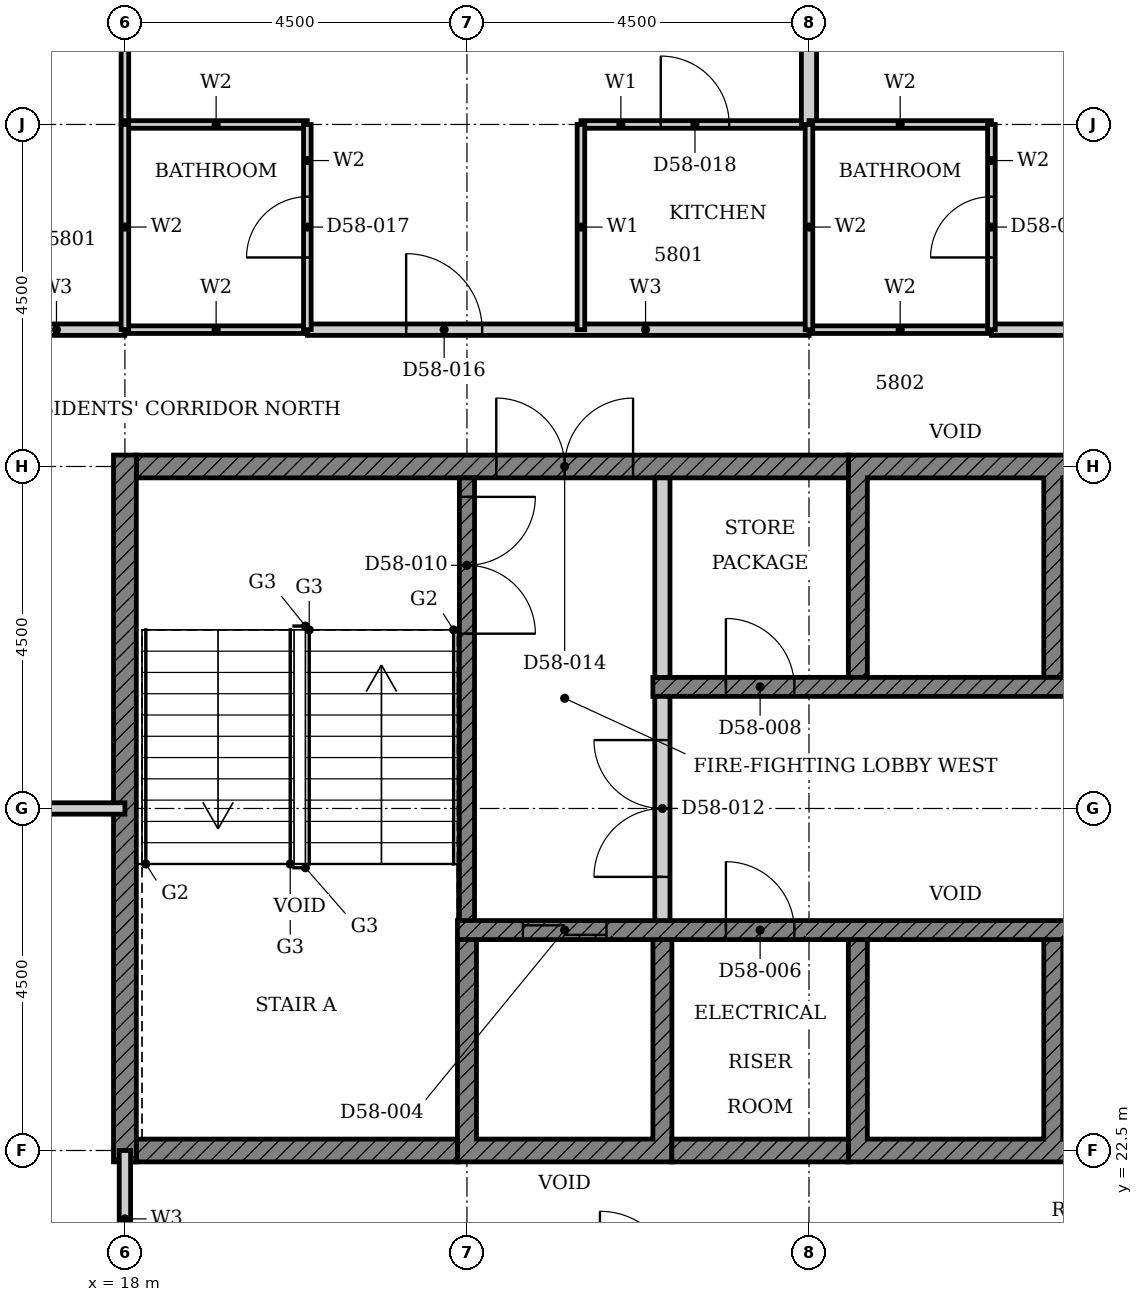
"""IFC4 building model, lengths in metres.
Left out: names, types, materials, properties, quantities, classifications, styles, units other than length and angle.
Written with IfcOpenShell. Run it as: python <this file> out.ifc"""

import sys

from ifc_helpers import new_model, si_unit, direction, frame, frame_2d, origin, place, context, subcontext, project, spatial, polyline, rectangle, outline, extrude, element, fill, save


model = new_model("IFC4")
c1 = context("Model", 3, precision=1e-05, world=origin(), true_north=direction((0.0, 1.0)))
c2 = subcontext(c1, "Body", "Model", "MODEL_VIEW")
j1 = project(units=[si_unit("LENGTHUNIT", "METRE"), si_unit("PLANEANGLEUNIT", "RADIAN")], contexts=[c1])
p1 = place(None, origin())
s1 = spatial("IfcSite", under=j1, at=p1, CompositionType="ELEMENT")
p2 = place(p1, origin())
s2 = spatial("IfcBuilding", under=s1, at=p2, CompositionType="ELEMENT")
p3 = place(p2, frame((0.0, 0.0, 229.4)))
s3 = spatial("IfcBuildingStorey", under=s2, at=p3, CompositionType="ELEMENT", Elevation=229.4)
p4 = place(p3, origin())
e1 = element("IfcWall", 1, at=p4, inside=s3, PredefinedType="SHEAR", context=c2, shape_type="SweptSolid", body=[
    extrude(outline(polyline([(22.375, 22.35), (25.197, 22.35), (25.197, 25.275), (24.947, 25.275), (24.947, 22.65), (22.625, 22.65), (22.625, 25.275), (22.375, 25.275), (22.375, 22.35)])), origin(), (0.0, 0.0, 1.0), 3.3),
])
p5 = place(p3, origin())
e2 = element("IfcWall", 2, at=p5, inside=s3, PredefinedType="SHEAR", context=c2, shape_type="SweptSolid", body=[
    extrude(outline(polyline([(27.518, 22.35), (32.911, 22.35), (32.911, 25.275), (32.661, 25.275), (32.661, 22.65), (30.339, 22.65), (30.339, 25.275), (30.089, 25.275), (30.089, 22.65), (27.768, 22.65), (27.768, 25.275), (27.518, 25.275), (27.518, 22.35)])), origin(), (0.0, 0.0, 1.0), 3.3),
])
p6 = place(p3, origin())
e3 = element("IfcWall", 3, at=p6, inside=s3, PredefinedType="SHEAR", context=c2, shape_type="SweptSolid", body=[
    extrude(outline(polyline([(27.518, 28.725), (27.768, 28.725), (27.768, 31.35), (30.089, 31.35), (30.089, 28.725), (30.339, 28.725), (30.339, 31.35), (32.661, 31.35), (32.661, 28.725), (32.911, 28.725), (32.911, 31.65), (27.518, 31.65), (27.518, 28.725)])), origin(), (0.0, 0.0, 1.0), 3.3),
])
p7 = place(p3, frame((18.15, 22.5, 0.0), z_axis=(0.0, 0.0, 1.0), x_axis=(1.0, 0.0, 0.0)))
e4 = element("IfcWall", 4, at=p7, inside=s3, PredefinedType="SHEAR", context=c2, shape_type="SweptSolid", body=[
    extrude(rectangle(XDim=4.225, YDim=0.3, at=frame_2d((2.113, 0.0))), origin(), (0.0, 0.0, 1.0), 3.3),
])
p8 = place(p3, frame((25.197, 22.5, 0.0), z_axis=(0.0, 0.0, 1.0), x_axis=(1.0, 0.0, 0.0)))
e5 = element("IfcWall", 5, at=p8, inside=s3, PredefinedType="SHEAR", context=c2, shape_type="SweptSolid", body=[
    extrude(rectangle(XDim=2.321, YDim=0.3, at=frame_2d((1.161, 0.0))), origin(), (0.0, 0.0, 1.0), 3.3),
])
p9 = place(p3, frame((18.15, 31.5, 0.0), z_axis=(0.0, 0.0, 1.0), x_axis=(1.0, 0.0, 0.0)))
e6 = element("IfcWall", 6, at=p9, inside=s3, PredefinedType="SHEAR", context=c2, shape_type="SweptSolid", body=[
    extrude(rectangle(XDim=9.368, YDim=0.3, at=frame_2d((4.684, 0.0))), origin(), (0.0, 0.0, 1.0), 3.3),
])
p10 = place(p9, frame((4.736, 0.0, 0.0)))
e7 = element("IfcOpeningElement", 7, at=p10, cuts=e6, PredefinedType="OPENING", context=c2, shape_type="SweptSolid", body=[
    extrude(rectangle(XDim=1.8, YDim=2.1, at=frame_2d((0.9, 1.05))), frame((0.0, 0.16, 0.0), z_axis=(0.0, -1.0, 0.0), x_axis=(1.0, 0.0, 0.0)), (0.0, 0.0, 1.0), 0.32),
])
p11 = place(p3, frame((18.0, 22.35, 0.0), z_axis=(0.0, 0.0, 1.0), x_axis=(0.0, 1.0, 0.0)))
e8 = element("IfcWall", 8, at=p11, inside=s3, PredefinedType="SHEAR", context=c2, shape_type="SweptSolid", body=[
    extrude(rectangle(XDim=9.3, YDim=0.3, at=frame_2d((4.65, 0.0))), origin(), (0.0, 0.0, 1.0), 3.3),
])
p12 = place(p3, frame((22.375, 25.4, 0.0), z_axis=(0.0, 0.0, 1.0), x_axis=(1.0, 0.0, 0.0)))
e9 = element("IfcWall", 9, at=p12, inside=s3, PredefinedType="SHEAR", context=c2, shape_type="SweptSolid", body=[
    extrude(rectangle(XDim=15.678, YDim=0.25, at=frame_2d((7.839, 0.0))), origin(), (0.0, 0.0, 1.0), 3.3),
])
p13 = place(p12, frame((8.575, 0.0, 0.0)))
e10 = element("IfcOpeningElement", 10, at=p13, cuts=e9, PredefinedType="OPENING", context=c2, shape_type="SweptSolid", body=[
    extrude(rectangle(XDim=1.1, YDim=2.1, at=frame_2d((0.55, 1.05))), frame((0.0, 0.135, 0.0), z_axis=(0.0, -1.0, 0.0), x_axis=(1.0, 0.0, 0.0)), (0.0, 0.0, 1.0), 0.27),
])
p14 = place(p12, frame((0.861, 0.0, 0.0)))
e11 = element("IfcOpeningElement", 11, at=p14, cuts=e9, PredefinedType="OPENING", context=c2, shape_type="SweptSolid", body=[
    extrude(rectangle(XDim=1.1, YDim=2.1, at=frame_2d((0.55, 1.05))), frame((0.0, 0.135, 0.0), z_axis=(0.0, -1.0, 0.0), x_axis=(1.0, 0.0, 0.0)), (0.0, 0.0, 1.0), 0.27),
])
p15 = place(p12, frame((3.532, 0.0, 0.0)))
e12 = element("IfcOpeningElement", 12, at=p15, cuts=e9, PredefinedType="OPENING", context=c2, shape_type="SweptSolid", body=[
    extrude(rectangle(XDim=0.9, YDim=2.1, at=frame_2d((0.45, 1.05))), frame((0.0, 0.135, 0.0), z_axis=(0.0, -1.0, 0.0), x_axis=(1.0, 0.0, 0.0)), (0.0, 0.0, 1.0), 0.27),
])
p16 = place(p12, frame((12.532, 0.0, 0.0)))
e13 = element("IfcOpeningElement", 13, at=p16, cuts=e9, PredefinedType="OPENING", context=c2, shape_type="SweptSolid", body=[
    extrude(rectangle(XDim=0.9, YDim=2.1, at=frame_2d((0.45, 1.05))), frame((0.0, 0.135, 0.0), z_axis=(0.0, -1.0, 0.0), x_axis=(1.0, 0.0, 0.0)), (0.0, 0.0, 1.0), 0.27),
])
p17 = place(p3, frame((24.947, 28.6, 0.0), z_axis=(0.0, 0.0, 1.0), x_axis=(1.0, 0.0, 0.0)))
e14 = element("IfcWall", 14, at=p17, inside=s3, PredefinedType="SHEAR", context=c2, shape_type="SweptSolid", body=[
    extrude(rectangle(XDim=15.678, YDim=0.25, at=frame_2d((7.839, 0.0))), origin(), (0.0, 0.0, 1.0), 3.3),
])
p18 = place(p17, frame((6.004, 0.0, 0.0)))
e15 = element("IfcOpeningElement", 15, at=p18, cuts=e14, PredefinedType="OPENING", context=c2, shape_type="SweptSolid", body=[
    extrude(rectangle(XDim=1.1, YDim=2.1, at=frame_2d((0.55, 1.05))), frame((0.0, 0.135, 0.0), z_axis=(0.0, -1.0, 0.0), x_axis=(1.0, 0.0, 0.0)), (0.0, 0.0, 1.0), 0.27),
])
p19 = place(p17, frame((11.146, 0.0, 0.0)))
e16 = element("IfcOpeningElement", 16, at=p19, cuts=e14, PredefinedType="OPENING", context=c2, shape_type="SweptSolid", body=[
    extrude(rectangle(XDim=1.1, YDim=2.1, at=frame_2d((0.55, 1.05))), frame((0.0, 0.135, 0.0), z_axis=(0.0, -1.0, 0.0), x_axis=(1.0, 0.0, 0.0)), (0.0, 0.0, 1.0), 0.27),
])
p20 = place(p17, frame((13.718, 0.0, 0.0)))
e17 = element("IfcOpeningElement", 17, at=p20, cuts=e14, PredefinedType="OPENING", context=c2, shape_type="SweptSolid", body=[
    extrude(rectangle(XDim=1.1, YDim=2.1, at=frame_2d((0.55, 1.05))), frame((0.0, 0.135, 0.0), z_axis=(0.0, -1.0, 0.0), x_axis=(1.0, 0.0, 0.0)), (0.0, 0.0, 1.0), 0.27),
])
p21 = place(p17, frame((0.961, 0.0, 0.0)))
e18 = element("IfcOpeningElement", 18, at=p21, cuts=e14, PredefinedType="OPENING", context=c2, shape_type="SweptSolid", body=[
    extrude(rectangle(XDim=0.9, YDim=2.1, at=frame_2d((0.45, 1.05))), frame((0.0, 0.135, 0.0), z_axis=(0.0, -1.0, 0.0), x_axis=(1.0, 0.0, 0.0)), (0.0, 0.0, 1.0), 0.27),
])
p22 = place(p17, frame((8.675, 0.0, 0.0)))
e19 = element("IfcOpeningElement", 19, at=p22, cuts=e14, PredefinedType="OPENING", context=c2, shape_type="SweptSolid", body=[
    extrude(rectangle(XDim=0.9, YDim=2.1, at=frame_2d((0.45, 1.05))), frame((0.0, 0.135, 0.0), z_axis=(0.0, -1.0, 0.0), x_axis=(1.0, 0.0, 0.0)), (0.0, 0.0, 1.0), 0.27),
])
p23 = place(p3, frame((25.072, 28.725, 0.0), z_axis=(0.0, 0.0, 1.0), x_axis=(0.0, 1.0, 0.0)))
e20 = element("IfcWall", 20, at=p23, inside=s3, PredefinedType="PARTITIONING", context=c2, shape_type="SweptSolid", body=[
    extrude(rectangle(XDim=2.625, YDim=0.2, at=frame_2d((1.312, 0.0))), origin(), (0.0, 0.0, 1.0), 3.3),
])
p24 = place(p3, frame((22.5, 31.35, 0.0), z_axis=(0.0, 0.0, 1.0), x_axis=(0.0, -1.0, 0.0)))
e21 = element("IfcWall", 21, at=p24, inside=s3, PredefinedType="SHEAR", context=c2, shape_type="SweptSolid", body=[
    extrude(rectangle(XDim=5.825, YDim=0.2, at=frame_2d((2.913, 0.0))), origin(), (0.0, 0.0, 1.0), 3.3),
])
p25 = place(p24, frame((0.25, 0.0, 0.0)))
e22 = element("IfcOpeningElement", 22, at=p25, cuts=e21, PredefinedType="OPENING", context=c2, shape_type="SweptSolid", body=[
    extrude(rectangle(XDim=1.8, YDim=2.1, at=frame_2d((0.9, 1.05))), frame((0.0, 0.11, 0.0), z_axis=(0.0, -1.0, 0.0), x_axis=(1.0, 0.0, 0.0)), (0.0, 0.0, 1.0), 0.22),
])
p26 = place(p3, frame((25.072, 25.525, 0.0), z_axis=(0.0, 0.0, 1.0), x_axis=(0.0, 1.0, 0.0)))
e23 = element("IfcWall", 23, at=p26, inside=s3, PredefinedType="PARTITIONING", context=c2, shape_type="SweptSolid", body=[
    extrude(rectangle(XDim=2.95, YDim=0.2, at=frame_2d((1.475, 0.0))), origin(), (0.0, 0.0, 1.0), 3.3),
])
p27 = place(p26, frame((0.575, 0.0, 0.0)))
e24 = element("IfcOpeningElement", 24, at=p27, cuts=e23, PredefinedType="OPENING", context=c2, shape_type="SweptSolid", body=[
    extrude(rectangle(XDim=1.8, YDim=2.1, at=frame_2d((0.9, 1.05))), frame((0.0, 0.11, 0.0), z_axis=(0.0, -1.0, 0.0), x_axis=(1.0, 0.0, 0.0)), (0.0, 0.0, 1.0), 0.22),
])
p28 = place(p3, frame((4.5, 27.0, 0.0), z_axis=(0.0, 0.0, 1.0), x_axis=(1.0, 0.0, 0.0)))
e25 = element("IfcWall", 25, at=p28, inside=s3, PredefinedType="PARTITIONING", context=c2, shape_type="SweptSolid", body=[
    extrude(rectangle(XDim=13.5, YDim=0.15, at=frame_2d((6.75, 0.0))), origin(), (0.0, 0.0, 1.0), 2.58),
])
p29 = place(p28, frame((5.35, 0.0, 0.0)))
e26 = element("IfcOpeningElement", 26, at=p29, cuts=e25, PredefinedType="OPENING", context=c2, shape_type="SweptSolid", body=[
    extrude(rectangle(XDim=1.0, YDim=2.1, at=frame_2d((0.5, 1.05))), frame((0.0, 0.085, 0.0), z_axis=(0.0, -1.0, 0.0), x_axis=(1.0, 0.0, 0.0)), (0.0, 0.0, 1.0), 0.17),
])
p30 = place(p3, frame((20.4, 33.3, 0.0), z_axis=(0.0, 0.0, 1.0), x_axis=(1.0, 0.0, 0.0)))
e27 = element("IfcWall", 27, at=p30, inside=s3, PredefinedType="PARTITIONING", context=c2, shape_type="SweptSolid", body=[
    extrude(rectangle(XDim=6.6, YDim=0.15, at=frame_2d((3.3, 0.0))), origin(), (0.0, 0.0, 1.0), 3.3),
])
p31 = place(p30, frame((1.3, 0.0, 0.0)))
e28 = element("IfcOpeningElement", 28, at=p31, cuts=e27, PredefinedType="OPENING", context=c2, shape_type="SweptSolid", body=[
    extrude(rectangle(XDim=1.0, YDim=2.2, at=frame_2d((0.5, 1.1))), frame((0.0, 0.085, 0.0), z_axis=(0.0, -1.0, 0.0), x_axis=(1.0, 0.0, 0.0)), (0.0, 0.0, 1.0), 0.17),
])
p32 = place(p3, frame((29.4, 33.3, 0.0), z_axis=(0.0, 0.0, 1.0), x_axis=(1.0, 0.0, 0.0)))
e29 = element("IfcWall", 29, at=p32, inside=s3, PredefinedType="PARTITIONING", context=c2, shape_type="SweptSolid", body=[
    extrude(rectangle(XDim=6.6, YDim=0.15, at=frame_2d((3.3, 0.0))), origin(), (0.0, 0.0, 1.0), 3.3),
])
p33 = place(p32, frame((1.3, 0.0, 0.0)))
e30 = element("IfcOpeningElement", 30, at=p33, cuts=e29, PredefinedType="OPENING", context=c2, shape_type="SweptSolid", body=[
    extrude(rectangle(XDim=1.0, YDim=2.2, at=frame_2d((0.5, 1.1))), frame((0.0, 0.085, 0.0), z_axis=(0.0, -1.0, 0.0), x_axis=(1.0, 0.0, 0.0)), (0.0, 0.0, 1.0), 0.17),
])
p34 = place(p3, frame((16.2, 33.3, 0.0), z_axis=(0.0, 0.0, 1.0), x_axis=(1.0, 0.0, 0.0)))
e31 = element("IfcWall", 31, at=p34, inside=s3, PredefinedType="PARTITIONING", context=c2, shape_type="SweptSolid", body=[
    extrude(rectangle(XDim=1.799, YDim=0.15, at=frame_2d((0.899, 0.0))), origin(), (0.0, 0.0, 1.0), 3.3),
])
p35 = place(p3, frame((18.0, 20.7, 0.0), z_axis=(0.0, 0.0, 1.0), x_axis=(0.0, 1.0, 0.0)))
e32 = element("IfcWall", 32, at=p35, inside=s3, PredefinedType="PARTITIONING", context=c2, shape_type="SweptSolid", body=[
    extrude(rectangle(XDim=1.8, YDim=0.15, at=frame_2d((0.9, 0.0))), origin(), (0.0, 0.0, 1.0), 3.3),
])
p36 = place(p3, frame((24.0, 36.0, 0.0), z_axis=(0.0, 0.0, 1.0), x_axis=(1.0, 0.0, 0.0)))
e33 = element("IfcWall", 33, at=p36, inside=s3, PredefinedType="PARTITIONING", context=c2, shape_type="SweptSolid", body=[
    extrude(rectangle(XDim=3.0, YDim=0.1, at=frame_2d((1.5, 0.0))), origin(), (0.0, 0.0, 1.0), 3.3),
])
p37 = place(p36, frame((1.05, 0.0, 0.0)))
e34 = element("IfcOpeningElement", 34, at=p37, cuts=e33, PredefinedType="OPENING", context=c2, shape_type="SweptSolid", body=[
    extrude(rectangle(XDim=0.9, YDim=2.1, at=frame_2d((0.45, 1.05))), frame((0.0, 0.06, 0.0), z_axis=(0.0, -1.0, 0.0), x_axis=(1.0, 0.0, 0.0)), (0.0, 0.0, 1.0), 0.12),
])
p38 = place(p3, frame((18.0, 36.0, 0.0), z_axis=(0.0, 0.0, 1.0), x_axis=(0.0, 1.0, 0.0)))
e35 = element("IfcWall", 35, at=p38, inside=s3, PredefinedType="PARTITIONING", context=c2, shape_type="SweptSolid", body=[
    extrude(rectangle(XDim=2.44, YDim=0.1, at=frame_2d((1.22, 0.0))), origin(), (0.0, 0.0, 1.0), 3.3),
])
p39 = place(p3, frame((24.0, 33.3, 0.0), z_axis=(0.0, 0.0, 1.0), x_axis=(0.0, 1.0, 0.0)))
e36 = element("IfcWall", 36, at=p39, inside=s3, PredefinedType="PARTITIONING", context=c2, shape_type="SweptSolid", body=[
    extrude(rectangle(XDim=2.7, YDim=0.1, at=frame_2d((1.35, 0.0))), origin(), (0.0, 0.0, 1.0), 3.3),
])
p40 = place(p3, frame((27.0, 36.0, 0.0), z_axis=(0.0, 0.0, 1.0), x_axis=(0.0, 1.0, 0.0)))
e37 = element("IfcWall", 37, at=p40, inside=s3, PredefinedType="PARTITIONING", context=c2, shape_type="SweptSolid", body=[
    extrude(rectangle(XDim=4.69, YDim=0.2, at=frame_2d((2.345, 0.0))), origin(), (0.0, 0.0, 1.0), 3.3),
])
for number, where, z_axis, x_axis in (
    (38, (18.0, 33.3, 0.0), (0.0, 0.0, 1.0), (1.0, 0.0, 0.0)),
    (39, (27.0, 33.3, 0.0), (0.0, 0.0, 1.0), (1.0, 0.0, 0.0)),
    (40, (18.0, 36.0, 0.0), (0.0, 0.0, 1.0), (1.0, 0.0, 0.0)),
    (41, (27.0, 36.0, 0.0), (0.0, 0.0, 1.0), (1.0, 0.0, 0.0)),
):
    element("IfcWall", number, at=place(p3, frame(where, z_axis=z_axis, x_axis=x_axis)), inside=s3, PredefinedType="PARTITIONING", context=c2, shape_type="SweptSolid", body=[
        extrude(rectangle(XDim=2.4, YDim=0.1, at=frame_2d((1.2, 0.0))), origin(), (0.0, 0.0, 1.0), 3.3),
    ])
p41 = place(p3, frame((18.0, 33.301, 0.0), z_axis=(0.0, 0.0, 1.0), x_axis=(0.0, 1.0, 0.0)))
e42 = element("IfcWall", 42, at=p41, inside=s3, PredefinedType="PARTITIONING", context=c2, shape_type="SweptSolid", body=[
    extrude(rectangle(XDim=2.699, YDim=0.1, at=frame_2d((1.35, 0.0))), origin(), (0.0, 0.0, 1.0), 3.3),
])
p42 = place(p3, frame((20.4, 33.3, 0.0), z_axis=(0.0, 0.0, 1.0), x_axis=(0.0, 1.0, 0.0)))
e43 = element("IfcWall", 43, at=p42, inside=s3, PredefinedType="PARTITIONING", context=c2, shape_type="SweptSolid", body=[
    extrude(rectangle(XDim=2.7, YDim=0.1, at=frame_2d((1.35, 0.0))), origin(), (0.0, 0.0, 1.0), 3.3),
])
p43 = place(p42, frame((0.95, 0.0, 0.0)))
e44 = element("IfcOpeningElement", 44, at=p43, cuts=e43, PredefinedType="OPENING", context=c2, shape_type="SweptSolid", body=[
    extrude(rectangle(XDim=0.8, YDim=2.1, at=frame_2d((0.4, 1.05))), frame((0.0, 0.06, 0.0), z_axis=(0.0, -1.0, 0.0), x_axis=(1.0, 0.0, 0.0)), (0.0, 0.0, 1.0), 0.12),
])
p44 = place(p3, frame((27.0, 33.3, 0.0), z_axis=(0.0, 0.0, 1.0), x_axis=(0.0, 1.0, 0.0)))
e45 = element("IfcWall", 45, at=p44, inside=s3, PredefinedType="PARTITIONING", context=c2, shape_type="SweptSolid", body=[
    extrude(rectangle(XDim=2.7, YDim=0.1, at=frame_2d((1.35, 0.0))), origin(), (0.0, 0.0, 1.0), 3.3),
])
p45 = place(p3, frame((29.4, 33.3, 0.0), z_axis=(0.0, 0.0, 1.0), x_axis=(0.0, 1.0, 0.0)))
e46 = element("IfcWall", 46, at=p45, inside=s3, PredefinedType="PARTITIONING", context=c2, shape_type="SweptSolid", body=[
    extrude(rectangle(XDim=2.7, YDim=0.1, at=frame_2d((1.35, 0.0))), origin(), (0.0, 0.0, 1.0), 3.3),
])
p46 = place(p45, frame((0.95, 0.0, 0.0)))
e47 = element("IfcOpeningElement", 47, at=p46, cuts=e46, PredefinedType="OPENING", context=c2, shape_type="SweptSolid", body=[
    extrude(rectangle(XDim=0.8, YDim=2.1, at=frame_2d((0.4, 1.05))), frame((0.0, 0.06, 0.0), z_axis=(0.0, -1.0, 0.0), x_axis=(1.0, 0.0, 0.0)), (0.0, 0.0, 1.0), 0.12),
])
p47 = place(p14, origin())
e48 = element("IfcDoor", 48, at=p47, inside=s3, OperationType="DOUBLE_DOOR_SLIDING", PredefinedType="DOOR", context=c2, shape_type="SweptSolid", body=[
    extrude(rectangle(XDim=1.1, YDim=2.1, at=frame_2d((0.55, 1.05))), frame((0.0, 0.025, 0.0), z_axis=(0.0, -1.0, 0.0), x_axis=(1.0, 0.0, 0.0)), (0.0, 0.0, 1.0), 0.05),
])
fill(e11, e48)
p48 = place(p15, origin())
e49 = element("IfcDoor", 49, at=p48, inside=s3, OperationType="SINGLE_SWING_LEFT", PredefinedType="DOOR", context=c2, shape_type="SweptSolid", body=[
    extrude(rectangle(XDim=0.9, YDim=2.1, at=frame_2d((0.45, 1.05))), frame((0.0, 0.025, 0.0), z_axis=(0.0, -1.0, 0.0), x_axis=(1.0, 0.0, 0.0)), (0.0, 0.0, 1.0), 0.05),
])
fill(e12, e49)
p49 = place(p21, origin())
e50 = element("IfcDoor", 50, at=p49, inside=s3, OperationType="SINGLE_SWING_LEFT", PredefinedType="DOOR", context=c2, shape_type="SweptSolid", body=[
    extrude(rectangle(XDim=0.9, YDim=2.1, at=frame_2d((0.45, 1.05))), frame((0.0, 0.025, 0.0), z_axis=(0.0, -1.0, 0.0), x_axis=(1.0, 0.0, 0.0)), (0.0, 0.0, 1.0), 0.05),
])
fill(e18, e50)
p50 = place(p25, origin())
e51 = element("IfcDoor", 51, at=p50, inside=s3, OperationType="DOUBLE_DOOR_SINGLE_SWING", PredefinedType="DOOR", context=c2, shape_type="SweptSolid", body=[
    extrude(rectangle(XDim=1.8, YDim=2.1, at=frame_2d((0.9, 1.05))), frame((0.0, 0.025, 0.0), z_axis=(0.0, -1.0, 0.0), x_axis=(1.0, 0.0, 0.0)), (0.0, 0.0, 1.0), 0.05),
])
fill(e22, e51)
p51 = place(p27, origin())
e52 = element("IfcDoor", 52, at=p51, inside=s3, OperationType="DOUBLE_DOOR_SINGLE_SWING", PredefinedType="DOOR", context=c2, shape_type="SweptSolid", body=[
    extrude(rectangle(XDim=1.8, YDim=2.1, at=frame_2d((0.9, 1.05))), frame((0.0, 0.025, 0.0), z_axis=(0.0, -1.0, 0.0), x_axis=(1.0, 0.0, 0.0)), (0.0, 0.0, 1.0), 0.05),
])
fill(e24, e52)
p52 = place(p10, origin())
e53 = element("IfcDoor", 53, at=p52, inside=s3, OperationType="DOUBLE_DOOR_SINGLE_SWING", PredefinedType="DOOR", context=c2, shape_type="SweptSolid", body=[
    extrude(rectangle(XDim=1.8, YDim=2.1, at=frame_2d((0.9, 1.05))), frame((0.0, 0.025, 0.0), z_axis=(0.0, -1.0, 0.0), x_axis=(1.0, 0.0, 0.0)), (0.0, 0.0, 1.0), 0.05),
])
fill(e7, e53)
p53 = place(p31, origin())
e54 = element("IfcDoor", 54, at=p53, inside=s3, OperationType="SINGLE_SWING_RIGHT", PredefinedType="DOOR", context=c2, shape_type="SweptSolid", body=[
    extrude(rectangle(XDim=1.0, YDim=2.2, at=frame_2d((0.5, 1.1))), frame((0.0, 0.025, 0.0), z_axis=(0.0, -1.0, 0.0), x_axis=(1.0, 0.0, 0.0)), (0.0, 0.0, 1.0), 0.05),
])
fill(e28, e54)
p54 = place(p43, origin())
e55 = element("IfcDoor", 55, at=p54, inside=s3, OperationType="SINGLE_SWING_RIGHT", PredefinedType="DOOR", context=c2, shape_type="SweptSolid", body=[
    extrude(rectangle(XDim=0.8, YDim=2.1, at=frame_2d((0.4, 1.05))), frame((0.0, 0.025, 0.0), z_axis=(0.0, -1.0, 0.0), x_axis=(1.0, 0.0, 0.0)), (0.0, 0.0, 1.0), 0.05),
])
fill(e44, e55)
p55 = place(p37, origin())
e56 = element("IfcDoor", 56, at=p55, inside=s3, OperationType="SINGLE_SWING_LEFT", PredefinedType="DOOR", context=c2, shape_type="SweptSolid", body=[
    extrude(rectangle(XDim=0.9, YDim=2.1, at=frame_2d((0.45, 1.05))), frame((0.0, 0.025, 0.0), z_axis=(0.0, -1.0, 0.0), x_axis=(1.0, 0.0, 0.0)), (0.0, 0.0, 1.0), 0.05),
])
fill(e34, e56)
p56 = place(p46, origin())
e57 = element("IfcDoor", 57, at=p56, inside=s3, OperationType="SINGLE_SWING_LEFT", PredefinedType="DOOR", context=c2, shape_type="SweptSolid", body=[
    extrude(rectangle(XDim=0.8, YDim=2.1, at=frame_2d((0.4, 1.05))), frame((0.0, 0.025, 0.0), z_axis=(0.0, -1.0, 0.0), x_axis=(1.0, 0.0, 0.0)), (0.0, 0.0, 1.0), 0.05),
])
fill(e47, e57)
save(model, sys.argv[1])
